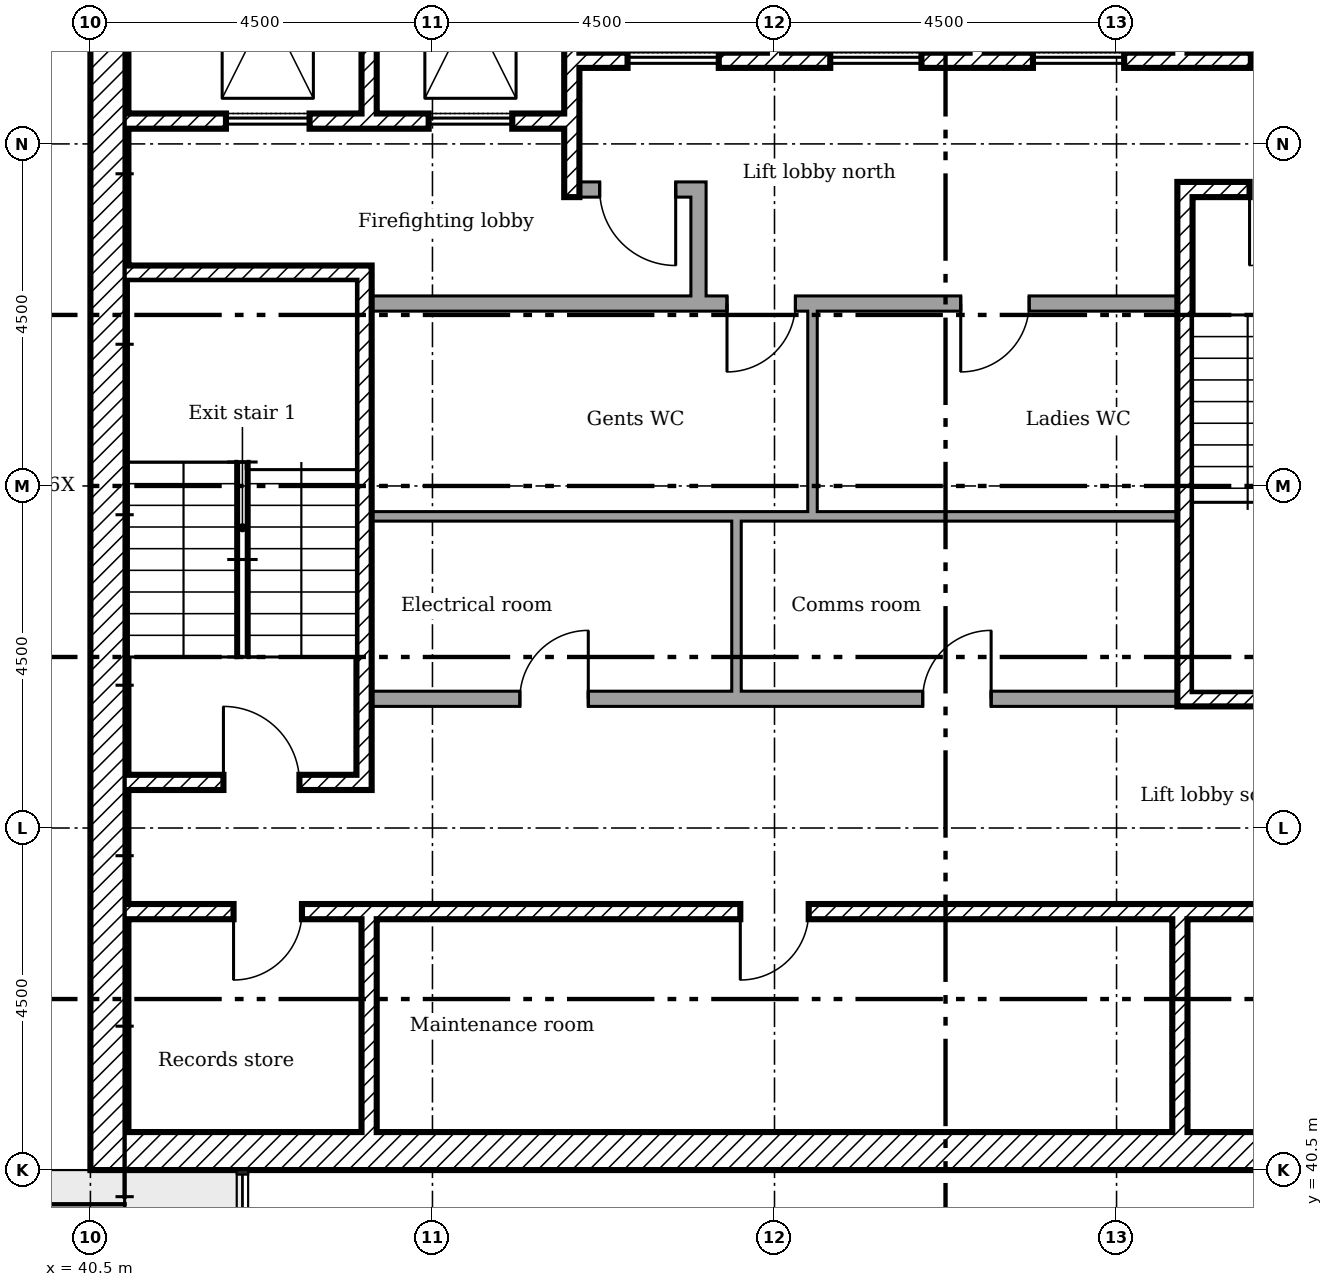
"""IFC4 building model, lengths in metres.
Left out: names, types, materials, properties, quantities, classifications, styles, units other than length and angle.
Written with IfcOpenShell. Run it as: python <this file> out.ifc"""

import sys

from ifc_helpers import new_model, si_unit, direction, frame, frame_2d, origin, place, context, subcontext, project, spatial, rectangle, extrude, element, fill, save


model = new_model("IFC4")
c1 = context("Model", 3, precision=1e-05, world=origin(), true_north=direction((0.0, 1.0)))
c2 = subcontext(c1, "Body", "Model", "MODEL_VIEW")
j1 = project(units=[si_unit("LENGTHUNIT", "METRE"), si_unit("PLANEANGLEUNIT", "RADIAN")], contexts=[c1])
p1 = place(None, origin())
s1 = spatial("IfcSite", under=j1, at=p1, CompositionType="ELEMENT")
p2 = place(p1, origin())
s2 = spatial("IfcBuilding", under=s1, at=p2, CompositionType="ELEMENT")
p3 = place(p2, frame((0.0, 0.0, 217.2)))
s3 = spatial("IfcBuildingStorey", under=s2, at=p3, CompositionType="ELEMENT", Elevation=217.2)
p4 = place(p3, frame((40.5, 40.75, 0.0)))
e1 = element("IfcWall", 1, at=p4, inside=s3, PredefinedType="SHEAR", context=c2, shape_type="SweptSolid", body=[
    extrude(rectangle(XDim=17.5, YDim=0.5, at=frame_2d((8.75, 0.0))), origin(), (0.0, 0.0, 1.0), 3.35),
])
p5 = place(p3, frame((40.75, 41.0, 0.0), z_axis=(0.0, 0.0, 1.0), x_axis=(0.0, 1.0, 0.0)))
e2 = element("IfcWall", 2, at=p5, inside=s3, PredefinedType="SHEAR", context=c2, shape_type="SweptSolid", body=[
    extrude(rectangle(XDim=17.0, YDim=0.5, at=frame_2d((8.5, 0.0))), origin(), (0.0, 0.0, 1.0), 3.35),
])
p6 = place(p3, frame((44.167, 58.0, 0.0), z_axis=(0.0, 0.0, 1.0), x_axis=(0.0, -1.0, 0.0)))
e3 = element("IfcWall", 3, at=p6, inside=s3, PredefinedType="SHEAR", context=c2, shape_type="SweptSolid", body=[
    extrude(rectangle(XDim=3.6, YDim=0.2, at=frame_2d((1.8, 0.0))), origin(), (0.0, 0.0, 1.0), 3.35),
])
p7 = place(p3, frame((46.833, 58.0, 0.0), z_axis=(0.0, 0.0, 1.0), x_axis=(0.0, -1.0, 0.0)))
e4 = element("IfcWall", 4, at=p7, inside=s3, PredefinedType="SHEAR", context=c2, shape_type="SweptSolid", body=[
    extrude(rectangle(XDim=4.7, YDim=0.2, at=frame_2d((2.35, 0.0))), origin(), (0.0, 0.0, 1.0), 3.35),
])
for number, where, z_axis, x_axis in (
    (5, (44.167, 41.0, 0.0), (0.0, 0.0, 1.0), (0.0, 1.0, 0.0)),
    (6, (54.833, 41.0, 0.0), (0.0, 0.0, 1.0), (0.0, 1.0, 0.0)),
):
    element("IfcWall", number, at=place(p3, frame(where, z_axis=z_axis, x_axis=x_axis)), inside=s3, PredefinedType="SHEAR", context=c2, shape_type="SweptSolid", body=[
        extrude(rectangle(XDim=2.8, YDim=0.2, at=frame_2d((1.4, 0.0))), origin(), (0.0, 0.0, 1.0), 3.35),
    ])
p8 = place(p3, frame((48.5, 51.9, 0.0), z_axis=(0.0, 0.0, 1.0), x_axis=(0.0, 1.0, 0.0)))
e7 = element("IfcWall", 7, at=p8, inside=s3, PredefinedType="PARTITIONING", context=c2, shape_type="SweptSolid", body=[
    extrude(rectangle(XDim=1.6, YDim=0.2, at=frame_2d((0.8, 0.0))), origin(), (0.0, 0.0, 1.0), 3.35),
])
p9 = place(p3, frame((46.933, 53.4, 0.0)))
e8 = element("IfcWall", 8, at=p9, inside=s3, PredefinedType="PARTITIONING", context=c2, shape_type="SweptSolid", body=[
    extrude(rectangle(XDim=1.467, YDim=0.2, at=frame_2d((0.733, 0.0))), origin(), (0.0, 0.0, 1.0), 3.35),
])
p10 = place(p9, frame((0.267, 0.0, 0.0)))
e9 = element("IfcOpeningElement", 9, at=p10, cuts=e8, PredefinedType="OPENING", context=c2, shape_type="SweptSolid", body=[
    extrude(rectangle(XDim=1.0, YDim=2.1, at=frame_2d((0.5, 1.05))), frame((0.0, 0.11, 0.0), z_axis=(0.0, -1.0, 0.0), x_axis=(1.0, 0.0, 0.0)), (0.0, 0.0, 1.0), 0.22),
])
p11 = place(p3, frame((46.933, 55.1, 0.0)))
e10 = element("IfcWall", 10, at=p11, inside=s3, PredefinedType="SHEAR", context=c2, shape_type="SweptSolid", body=[
    extrude(rectangle(XDim=11.067, YDim=0.2, at=frame_2d((5.533, 0.0))), origin(), (0.0, 0.0, 1.0), 3.35),
])
p12 = place(p11, frame((8.833, 0.0, 0.0)))
e11 = element("IfcOpeningElement", 11, at=p12, cuts=e10, PredefinedType="OPENING", context=c2, shape_type="SweptSolid", body=[
    extrude(rectangle(XDim=0.9, YDim=2.1, at=frame_2d((0.45, 1.05))), frame((0.0, 0.11, 0.0), z_axis=(0.0, -1.0, 0.0), x_axis=(1.0, 0.0, 0.0)), (0.0, 0.0, 1.0), 0.22),
])
p13 = place(p11, frame((0.633, 0.0, 0.0)))
e12 = element("IfcOpeningElement", 12, at=p13, cuts=e10, PredefinedType="OPENING", context=c2, shape_type="SweptSolid", body=[
    extrude(rectangle(XDim=1.2, YDim=2.1, at=frame_2d((0.6, 1.05))), frame((0.0, 0.11, 0.0), z_axis=(0.0, -1.0, 0.0), x_axis=(1.0, 0.0, 0.0)), (0.0, 0.0, 1.0), 0.22),
])
p14 = place(p11, frame((3.3, 0.0, 0.0)))
e13 = element("IfcOpeningElement", 13, at=p14, cuts=e10, PredefinedType="OPENING", context=c2, shape_type="SweptSolid", body=[
    extrude(rectangle(XDim=1.2, YDim=2.1, at=frame_2d((0.6, 1.05))), frame((0.0, 0.11, 0.0), z_axis=(0.0, -1.0, 0.0), x_axis=(1.0, 0.0, 0.0)), (0.0, 0.0, 1.0), 0.22),
])
p15 = place(p11, frame((5.967, 0.0, 0.0)))
e14 = element("IfcOpeningElement", 14, at=p15, cuts=e10, PredefinedType="OPENING", context=c2, shape_type="SweptSolid", body=[
    extrude(rectangle(XDim=1.2, YDim=2.1, at=frame_2d((0.6, 1.05))), frame((0.0, 0.11, 0.0), z_axis=(0.0, -1.0, 0.0), x_axis=(1.0, 0.0, 0.0)), (0.0, 0.0, 1.0), 0.22),
])
p16 = place(p3, frame((41.0, 54.3, 0.0)))
e15 = element("IfcWall", 15, at=p16, inside=s3, PredefinedType="SHEAR", context=c2, shape_type="SweptSolid", body=[
    extrude(rectangle(XDim=5.733, YDim=0.2, at=frame_2d((2.867, 0.0))), origin(), (0.0, 0.0, 1.0), 3.35),
])
p17 = place(p16, frame((1.283, 0.0, 0.0)))
e16 = element("IfcOpeningElement", 16, at=p17, cuts=e15, PredefinedType="OPENING", context=c2, shape_type="SweptSolid", body=[
    extrude(rectangle(XDim=1.1, YDim=2.1, at=frame_2d((0.55, 1.05))), frame((0.0, 0.11, 0.0), z_axis=(0.0, -1.0, 0.0), x_axis=(1.0, 0.0, 0.0)), (0.0, 0.0, 1.0), 0.22),
])
p18 = place(p16, frame((3.95, 0.0, 0.0)))
e17 = element("IfcOpeningElement", 17, at=p18, cuts=e15, PredefinedType="OPENING", context=c2, shape_type="SweptSolid", body=[
    extrude(rectangle(XDim=1.1, YDim=2.1, at=frame_2d((0.55, 1.05))), frame((0.0, 0.11, 0.0), z_axis=(0.0, -1.0, 0.0), x_axis=(1.0, 0.0, 0.0)), (0.0, 0.0, 1.0), 0.22),
])
p19 = place(p3, frame((41.0, 43.9, 0.0)))
e18 = element("IfcWall", 18, at=p19, inside=s3, PredefinedType="SHEAR", context=c2, shape_type="SweptSolid", body=[
    extrude(rectangle(XDim=17.0, YDim=0.2, at=frame_2d((8.5, 0.0))), origin(), (0.0, 0.0, 1.0), 3.35),
])
p20 = place(p19, frame((1.383, 0.0, 0.0)))
e19 = element("IfcOpeningElement", 19, at=p20, cuts=e18, PredefinedType="OPENING", context=c2, shape_type="SweptSolid", body=[
    extrude(rectangle(XDim=0.9, YDim=2.1, at=frame_2d((0.45, 1.05))), frame((0.0, 0.11, 0.0), z_axis=(0.0, -1.0, 0.0), x_axis=(1.0, 0.0, 0.0)), (0.0, 0.0, 1.0), 0.22),
])
p21 = place(p19, frame((8.05, 0.0, 0.0)))
e20 = element("IfcOpeningElement", 20, at=p21, cuts=e18, PredefinedType="OPENING", context=c2, shape_type="SweptSolid", body=[
    extrude(rectangle(XDim=0.9, YDim=2.1, at=frame_2d((0.45, 1.05))), frame((0.0, 0.11, 0.0), z_axis=(0.0, -1.0, 0.0), x_axis=(1.0, 0.0, 0.0)), (0.0, 0.0, 1.0), 0.22),
])
p22 = place(p3, frame((44.1, 45.5, 0.0), z_axis=(0.0, 0.0, 1.0), x_axis=(0.0, 1.0, 0.0)))
e21 = element("IfcWall", 21, at=p22, inside=s3, PredefinedType="SHEAR", context=c2, shape_type="SweptSolid", body=[
    extrude(rectangle(XDim=6.9, YDim=0.2, at=frame_2d((3.45, 0.0))), origin(), (0.0, 0.0, 1.0), 3.35),
])
p23 = place(p3, frame((41.0, 52.3, 0.0)))
e22 = element("IfcWall", 22, at=p23, inside=s3, PredefinedType="SHEAR", context=c2, shape_type="SweptSolid", body=[
    extrude(rectangle(XDim=3.0, YDim=0.2, at=frame_2d((1.5, 0.0))), origin(), (0.0, 0.0, 1.0), 3.35),
])
p24 = place(p3, frame((41.0, 45.6, 0.0)))
e23 = element("IfcWall", 23, at=p24, inside=s3, PredefinedType="SHEAR", context=c2, shape_type="SweptSolid", body=[
    extrude(rectangle(XDim=3.0, YDim=0.2, at=frame_2d((1.5, 0.0))), origin(), (0.0, 0.0, 1.0), 3.35),
])
p25 = place(p24, frame((1.25, 0.0, 0.0)))
e24 = element("IfcOpeningElement", 24, at=p25, cuts=e23, PredefinedType="OPENING", context=c2, shape_type="SweptSolid", body=[
    extrude(rectangle(XDim=1.0, YDim=2.1, at=frame_2d((0.5, 1.05))), frame((0.0, 0.11, 0.0), z_axis=(0.0, -1.0, 0.0), x_axis=(1.0, 0.0, 0.0)), (0.0, 0.0, 1.0), 0.22),
])
p26 = place(p3, frame((54.8, 53.4, 0.0)))
e25 = element("IfcWall", 25, at=p26, inside=s3, PredefinedType="SHEAR", context=c2, shape_type="SweptSolid", body=[
    extrude(rectangle(XDim=3.2, YDim=0.2, at=frame_2d((1.6, 0.0))), origin(), (0.0, 0.0, 1.0), 3.35),
])
p27 = place(p26, frame((0.95, 0.0, 0.0)))
e26 = element("IfcOpeningElement", 26, at=p27, cuts=e25, PredefinedType="OPENING", context=c2, shape_type="SweptSolid", body=[
    extrude(rectangle(XDim=1.0, YDim=2.1, at=frame_2d((0.5, 1.05))), frame((0.0, 0.11, 0.0), z_axis=(0.0, -1.0, 0.0), x_axis=(1.0, 0.0, 0.0)), (0.0, 0.0, 1.0), 0.22),
])
p28 = place(p3, frame((54.8, 46.7, 0.0)))
e27 = element("IfcWall", 27, at=p28, inside=s3, PredefinedType="SHEAR", context=c2, shape_type="SweptSolid", body=[
    extrude(rectangle(XDim=3.2, YDim=0.2, at=frame_2d((1.6, 0.0))), origin(), (0.0, 0.0, 1.0), 3.35),
])
p29 = place(p3, frame((54.9, 46.8, 0.0), z_axis=(0.0, 0.0, 1.0), x_axis=(0.0, 1.0, 0.0)))
e28 = element("IfcWall", 28, at=p29, inside=s3, PredefinedType="SHEAR", context=c2, shape_type="SweptSolid", body=[
    extrude(rectangle(XDim=6.5, YDim=0.2, at=frame_2d((3.25, 0.0))), origin(), (0.0, 0.0, 1.0), 3.35),
])
p30 = place(p3, frame((44.2, 51.9, 0.0)))
e29 = element("IfcWall", 29, at=p30, inside=s3, PredefinedType="PARTITIONING", context=c2, shape_type="SweptSolid", body=[
    extrude(rectangle(XDim=10.6, YDim=0.2, at=frame_2d((5.3, 0.0))), origin(), (0.0, 0.0, 1.0), 3.35),
])
p31 = place(p30, frame((4.675, 0.0, 0.0)))
e30 = element("IfcOpeningElement", 30, at=p31, cuts=e29, PredefinedType="OPENING", context=c2, shape_type="SweptSolid", body=[
    extrude(rectangle(XDim=0.9, YDim=2.1, at=frame_2d((0.45, 1.05))), frame((0.0, 0.11, 0.0), z_axis=(0.0, -1.0, 0.0), x_axis=(1.0, 0.0, 0.0)), (0.0, 0.0, 1.0), 0.22),
])
p32 = place(p30, frame((7.75, 0.0, 0.0)))
e31 = element("IfcOpeningElement", 31, at=p32, cuts=e29, PredefinedType="OPENING", context=c2, shape_type="SweptSolid", body=[
    extrude(rectangle(XDim=0.9, YDim=2.1, at=frame_2d((0.45, 1.05))), frame((0.0, 0.11, 0.0), z_axis=(0.0, -1.0, 0.0), x_axis=(1.0, 0.0, 0.0)), (0.0, 0.0, 1.0), 0.22),
])
p33 = place(p3, frame((44.2, 46.7, 0.0)))
e32 = element("IfcWall", 32, at=p33, inside=s3, PredefinedType="PARTITIONING", context=c2, shape_type="SweptSolid", body=[
    extrude(rectangle(XDim=10.6, YDim=0.2, at=frame_2d((5.3, 0.0))), origin(), (0.0, 0.0, 1.0), 3.35),
])
p34 = place(p33, frame((1.95, 0.0, 0.0)))
e33 = element("IfcOpeningElement", 33, at=p34, cuts=e32, PredefinedType="OPENING", context=c2, shape_type="SweptSolid", body=[
    extrude(rectangle(XDim=0.9, YDim=2.1, at=frame_2d((0.45, 1.05))), frame((0.0, 0.11, 0.0), z_axis=(0.0, -1.0, 0.0), x_axis=(1.0, 0.0, 0.0)), (0.0, 0.0, 1.0), 0.22),
])
p35 = place(p33, frame((7.25, 0.0, 0.0)))
e34 = element("IfcOpeningElement", 34, at=p35, cuts=e32, PredefinedType="OPENING", context=c2, shape_type="SweptSolid", body=[
    extrude(rectangle(XDim=0.9, YDim=2.1, at=frame_2d((0.45, 1.05))), frame((0.0, 0.11, 0.0), z_axis=(0.0, -1.0, 0.0), x_axis=(1.0, 0.0, 0.0)), (0.0, 0.0, 1.0), 0.22),
])
p36 = place(p3, frame((49.0, 46.8, 0.0), z_axis=(0.0, 0.0, 1.0), x_axis=(0.0, 1.0, 0.0)))
e35 = element("IfcWall", 35, at=p36, inside=s3, PredefinedType="PARTITIONING", context=c2, shape_type="SweptSolid", body=[
    extrude(rectangle(XDim=2.363, YDim=0.125, at=frame_2d((1.181, 0.0))), origin(), (0.0, 0.0, 1.0), 3.35),
])
p37 = place(p3, frame((48.938, 49.1, 0.0), z_axis=(0.0, 0.0, 1.0), x_axis=(-1.0, 0.0, 0.0)))
e36 = element("IfcWall", 36, at=p37, inside=s3, PredefinedType="PARTITIONING", context=c2, shape_type="SweptSolid", body=[
    extrude(rectangle(XDim=4.738, YDim=0.125, at=frame_2d((2.369, 0.0))), origin(), (0.0, 0.0, 1.0), 3.35),
])
p38 = place(p3, frame((50.062, 49.1, 0.0), z_axis=(0.0, 0.0, 1.0), x_axis=(-1.0, 0.0, 0.0)))
e37 = element("IfcWall", 37, at=p38, inside=s3, PredefinedType="PARTITIONING", context=c2, shape_type="SweptSolid", body=[
    extrude(rectangle(XDim=1.062, YDim=0.125, at=frame_2d((0.531, 0.0))), origin(), (0.0, 0.0, 1.0), 3.35),
])
p39 = place(p3, frame((54.8, 49.1, 0.0), z_axis=(0.0, 0.0, 1.0), x_axis=(-1.0, 0.0, 0.0)))
e38 = element("IfcWall", 38, at=p39, inside=s3, PredefinedType="PARTITIONING", context=c2, shape_type="SweptSolid", body=[
    extrude(rectangle(XDim=4.8, YDim=0.125, at=frame_2d((2.4, 0.0))), origin(), (0.0, 0.0, 1.0), 3.35),
])
p40 = place(p3, frame((50.0, 49.163, 0.0), z_axis=(0.0, 0.0, 1.0), x_axis=(0.0, 1.0, 0.0)))
e39 = element("IfcWall", 39, at=p40, inside=s3, PredefinedType="PARTITIONING", context=c2, shape_type="SweptSolid", body=[
    extrude(rectangle(XDim=2.637, YDim=0.125, at=frame_2d((1.319, 0.0))), origin(), (0.0, 0.0, 1.0), 3.35),
])
p41 = place(p25, origin())
e40 = element("IfcDoor", 40, at=p41, inside=s3, OperationType="SINGLE_SWING_RIGHT", PredefinedType="DOOR", context=c2, shape_type="SweptSolid", body=[
    extrude(rectangle(XDim=1.0, YDim=2.1, at=frame_2d((0.5, 1.05))), frame((0.0, 0.025, 0.0), z_axis=(0.0, -1.0, 0.0), x_axis=(1.0, 0.0, 0.0)), (0.0, 0.0, 1.0), 0.05),
])
fill(e24, e40)
p42 = place(p27, frame((1.0, 0.0, 0.0), x_axis=(-1.0, 0.0, 0.0)))
e41 = element("IfcDoor", 41, at=p42, inside=s3, OperationType="SINGLE_SWING_LEFT", PredefinedType="DOOR", context=c2, shape_type="SweptSolid", body=[
    extrude(rectangle(XDim=1.0, YDim=2.1, at=frame_2d((0.5, 1.05))), frame((0.0, 0.025, 0.0), z_axis=(0.0, -1.0, 0.0), x_axis=(1.0, 0.0, 0.0)), (0.0, 0.0, 1.0), 0.05),
])
fill(e26, e41)
p43 = place(p10, frame((1.0, 0.0, 0.0), x_axis=(-1.0, 0.0, 0.0)))
e42 = element("IfcDoor", 42, at=p43, inside=s3, OperationType="SINGLE_SWING_RIGHT", PredefinedType="DOOR", context=c2, shape_type="SweptSolid", body=[
    extrude(rectangle(XDim=1.0, YDim=2.1, at=frame_2d((0.5, 1.05))), frame((0.0, 0.025, 0.0), z_axis=(0.0, -1.0, 0.0), x_axis=(1.0, 0.0, 0.0)), (0.0, 0.0, 1.0), 0.05),
])
fill(e9, e42)
p44 = place(p12, origin())
e43 = element("IfcDoor", 43, at=p44, inside=s3, OperationType="SINGLE_SWING_RIGHT", PredefinedType="DOOR", context=c2, shape_type="SweptSolid", body=[
    extrude(rectangle(XDim=0.9, YDim=2.1, at=frame_2d((0.45, 1.05))), frame((0.0, 0.025, 0.0), z_axis=(0.0, -1.0, 0.0), x_axis=(1.0, 0.0, 0.0)), (0.0, 0.0, 1.0), 0.05),
])
fill(e11, e43)
p45 = place(p20, frame((0.9, 0.0, 0.0), x_axis=(-1.0, 0.0, 0.0)))
e44 = element("IfcDoor", 44, at=p45, inside=s3, OperationType="SINGLE_SWING_LEFT", PredefinedType="DOOR", context=c2, shape_type="SweptSolid", body=[
    extrude(rectangle(XDim=0.9, YDim=2.1, at=frame_2d((0.45, 1.05))), frame((0.0, 0.025, 0.0), z_axis=(0.0, -1.0, 0.0), x_axis=(1.0, 0.0, 0.0)), (0.0, 0.0, 1.0), 0.05),
])
fill(e19, e44)
p46 = place(p21, frame((0.9, 0.0, 0.0), x_axis=(-1.0, 0.0, 0.0)))
e45 = element("IfcDoor", 45, at=p46, inside=s3, OperationType="SINGLE_SWING_LEFT", PredefinedType="DOOR", context=c2, shape_type="SweptSolid", body=[
    extrude(rectangle(XDim=0.9, YDim=2.1, at=frame_2d((0.45, 1.05))), frame((0.0, 0.025, 0.0), z_axis=(0.0, -1.0, 0.0), x_axis=(1.0, 0.0, 0.0)), (0.0, 0.0, 1.0), 0.05),
])
fill(e20, e45)
p47 = place(p34, origin())
e46 = element("IfcDoor", 46, at=p47, inside=s3, OperationType="SINGLE_SWING_LEFT", PredefinedType="DOOR", context=c2, shape_type="SweptSolid", body=[
    extrude(rectangle(XDim=0.9, YDim=2.1, at=frame_2d((0.45, 1.05))), frame((0.0, 0.025, 0.0), z_axis=(0.0, -1.0, 0.0), x_axis=(1.0, 0.0, 0.0)), (0.0, 0.0, 1.0), 0.05),
])
fill(e33, e46)
p48 = place(p35, origin())
e47 = element("IfcDoor", 47, at=p48, inside=s3, OperationType="SINGLE_SWING_LEFT", PredefinedType="DOOR", context=c2, shape_type="SweptSolid", body=[
    extrude(rectangle(XDim=0.9, YDim=2.1, at=frame_2d((0.45, 1.05))), frame((0.0, 0.025, 0.0), z_axis=(0.0, -1.0, 0.0), x_axis=(1.0, 0.0, 0.0)), (0.0, 0.0, 1.0), 0.05),
])
fill(e34, e47)
p49 = place(p31, frame((0.9, 0.0, 0.0), x_axis=(-1.0, 0.0, 0.0)))
e48 = element("IfcDoor", 48, at=p49, inside=s3, OperationType="SINGLE_SWING_LEFT", PredefinedType="DOOR", context=c2, shape_type="SweptSolid", body=[
    extrude(rectangle(XDim=0.9, YDim=2.1, at=frame_2d((0.45, 1.05))), frame((0.0, 0.025, 0.0), z_axis=(0.0, -1.0, 0.0), x_axis=(1.0, 0.0, 0.0)), (0.0, 0.0, 1.0), 0.05),
])
fill(e30, e48)
p50 = place(p32, frame((0.9, 0.0, 0.0), x_axis=(-1.0, 0.0, 0.0)))
e49 = element("IfcDoor", 49, at=p50, inside=s3, OperationType="SINGLE_SWING_LEFT", PredefinedType="DOOR", context=c2, shape_type="SweptSolid", body=[
    extrude(rectangle(XDim=0.9, YDim=2.1, at=frame_2d((0.45, 1.05))), frame((0.0, 0.025, 0.0), z_axis=(0.0, -1.0, 0.0), x_axis=(1.0, 0.0, 0.0)), (0.0, 0.0, 1.0), 0.05),
])
fill(e31, e49)
p51 = place(p17, origin())
e50 = element("IfcDoor", 50, at=p51, inside=s3, OperationType="SLIDING_TO_LEFT", PredefinedType="DOOR", context=c2, shape_type="SweptSolid", body=[
    extrude(rectangle(XDim=1.1, YDim=2.1, at=frame_2d((0.55, 1.05))), frame((0.0, 0.025, 0.0), z_axis=(0.0, -1.0, 0.0), x_axis=(1.0, 0.0, 0.0)), (0.0, 0.0, 1.0), 0.05),
])
fill(e16, e50)
p52 = place(p18, origin())
e51 = element("IfcDoor", 51, at=p52, inside=s3, OperationType="SLIDING_TO_LEFT", PredefinedType="DOOR", context=c2, shape_type="SweptSolid", body=[
    extrude(rectangle(XDim=1.1, YDim=2.1, at=frame_2d((0.55, 1.05))), frame((0.0, 0.025, 0.0), z_axis=(0.0, -1.0, 0.0), x_axis=(1.0, 0.0, 0.0)), (0.0, 0.0, 1.0), 0.05),
])
fill(e17, e51)
p53 = place(p13, origin())
e52 = element("IfcDoor", 52, at=p53, inside=s3, OperationType="SLIDING_TO_LEFT", PredefinedType="DOOR", context=c2, shape_type="SweptSolid", body=[
    extrude(rectangle(XDim=1.2, YDim=2.1, at=frame_2d((0.6, 1.05))), frame((0.0, 0.025, 0.0), z_axis=(0.0, -1.0, 0.0), x_axis=(1.0, 0.0, 0.0)), (0.0, 0.0, 1.0), 0.05),
])
fill(e12, e52)
p54 = place(p14, origin())
e53 = element("IfcDoor", 53, at=p54, inside=s3, OperationType="SLIDING_TO_LEFT", PredefinedType="DOOR", context=c2, shape_type="SweptSolid", body=[
    extrude(rectangle(XDim=1.2, YDim=2.1, at=frame_2d((0.6, 1.05))), frame((0.0, 0.025, 0.0), z_axis=(0.0, -1.0, 0.0), x_axis=(1.0, 0.0, 0.0)), (0.0, 0.0, 1.0), 0.05),
])
fill(e13, e53)
p55 = place(p15, origin())
e54 = element("IfcDoor", 54, at=p55, inside=s3, OperationType="SLIDING_TO_LEFT", PredefinedType="DOOR", context=c2, shape_type="SweptSolid", body=[
    extrude(rectangle(XDim=1.2, YDim=2.1, at=frame_2d((0.6, 1.05))), frame((0.0, 0.025, 0.0), z_axis=(0.0, -1.0, 0.0), x_axis=(1.0, 0.0, 0.0)), (0.0, 0.0, 1.0), 0.05),
])
fill(e14, e54)
save(model, sys.argv[1])
